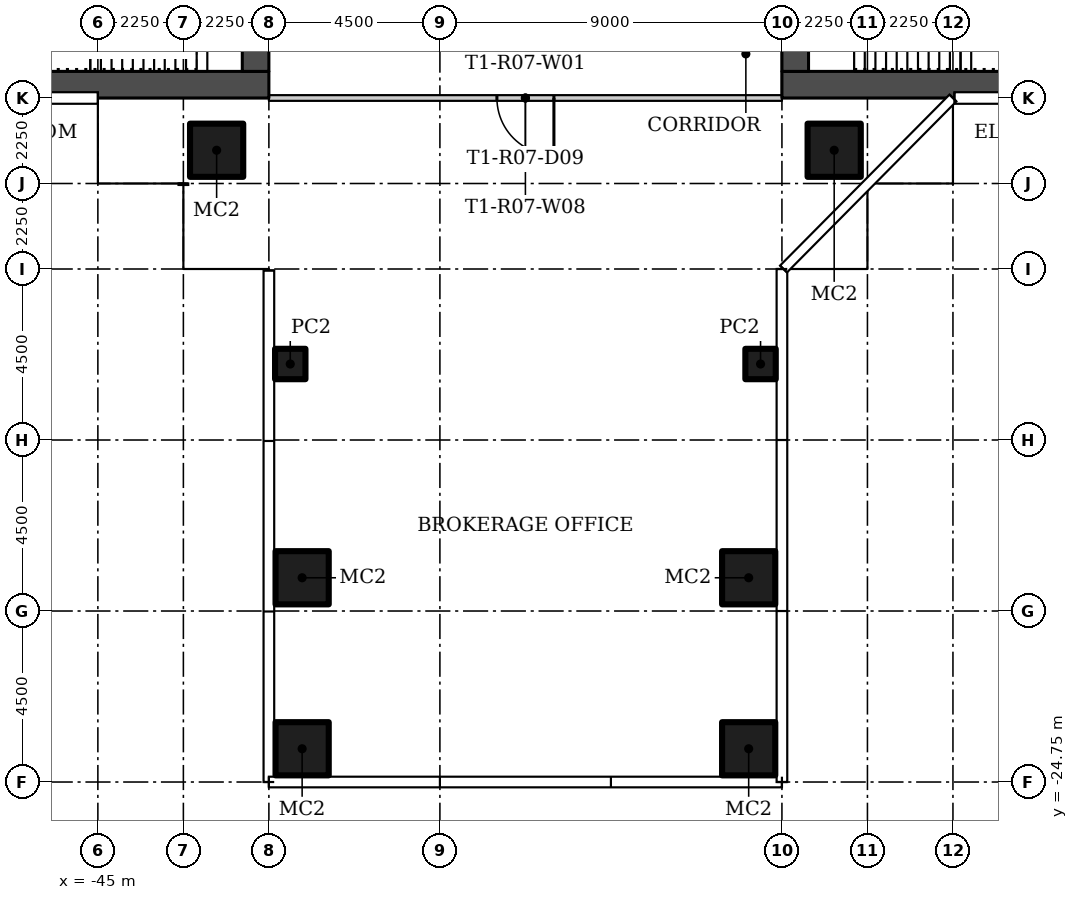
"""IFC4 building model, lengths in metres.
Left out: names, types, materials, properties, quantities, classifications, styles, units other than length and angle.
Written with IfcOpenShell. Run it as: python <this file> out.ifc"""

import sys

from ifc_helpers import new_model, si_unit, direction, frame, frame_2d, origin, origin_2d, place, context, subcontext, project, spatial, rectangle, hollow_rectangle, extrude, element, fill, save


model = new_model("IFC4")
c1 = context("Model", 3, precision=1e-05, world=origin(), true_north=direction((0.0, 1.0)))
c2 = subcontext(c1, "Body", "Model", "MODEL_VIEW")
j1 = project(units=[si_unit("LENGTHUNIT", "METRE"), si_unit("PLANEANGLEUNIT", "RADIAN")], contexts=[c1])
p1 = place(None, origin())
s1 = spatial("IfcSite", under=j1, at=p1, CompositionType="ELEMENT")
p2 = place(p1, origin())
s2 = spatial("IfcBuilding", under=s1, at=p2, CompositionType="ELEMENT")
p3 = place(p2, frame((0.0, 0.0, 69.3)))
s3 = spatial("IfcBuildingStorey", under=s2, at=p3, CompositionType="ELEMENT", Elevation=69.3)
for number, where in (
    (1, (-25.625, -8.125, 0.0)),
    (2, (-41.875, -8.125, 0.0)),
):
    element("IfcColumn", number, at=place(p3, frame(where)), inside=s3, PredefinedType="COLUMN", context=c2, shape_type="SweptSolid", body=[
        extrude(hollow_rectangle(XDim=1.4, YDim=1.4, WallThickness=0.05, at=origin_2d()), origin(), (0.0, 0.0, 1.0), 3.55),
    ])
p4 = place(p3, frame((-39.938, -13.75, 0.0)))
e3 = element("IfcColumn", 3, at=p4, inside=s3, PredefinedType="COLUMN", context=c2, shape_type="SweptSolid", body=[
    extrude(hollow_rectangle(XDim=0.8, YDim=0.8, WallThickness=0.025, at=origin_2d()), origin(), (0.0, 0.0, 1.0), 3.55),
])
for number, where in (
    (4, (-39.625, -19.375, 0.0)),
    (5, (-39.625, -23.875, 0.0)),
):
    element("IfcColumn", number, at=place(p3, frame(where)), inside=s3, PredefinedType="COLUMN", context=c2, shape_type="SweptSolid", body=[
        extrude(hollow_rectangle(XDim=1.4, YDim=1.4, WallThickness=0.05, at=origin_2d()), origin(), (0.0, 0.0, 1.0), 3.55),
    ])
p5 = place(p3, frame((-27.562, -13.75, 0.0)))
e6 = element("IfcColumn", 6, at=p5, inside=s3, PredefinedType="COLUMN", context=c2, shape_type="SweptSolid", body=[
    extrude(hollow_rectangle(XDim=0.8, YDim=0.8, WallThickness=0.025, at=origin_2d()), origin(), (0.0, 0.0, 1.0), 3.55),
])
for number, where in (
    (7, (-27.875, -19.375, 0.0)),
    (8, (-27.875, -23.875, 0.0)),
):
    element("IfcColumn", number, at=place(p3, frame(where)), inside=s3, PredefinedType="COLUMN", context=c2, shape_type="SweptSolid", body=[
        extrude(hollow_rectangle(XDim=1.4, YDim=1.4, WallThickness=0.05, at=origin_2d()), origin(), (0.0, 0.0, 1.0), 3.55),
    ])
p6 = place(p3, frame((-27.0, -6.75, 0.0), z_axis=(0.0, 0.0, 1.0), x_axis=(-1.0, 0.0, 0.0)))
e9 = element("IfcWall", 9, at=p6, inside=s3, PredefinedType="PARTITIONING", context=c2, shape_type="SweptSolid", body=[
    extrude(rectangle(XDim=13.5, YDim=0.15, at=frame_2d((6.75, 0.0))), origin(), (0.0, 0.0, 1.0), 3.55),
])
p7 = place(p6, frame((6.0, 0.0, 0.0)))
e10 = element("IfcOpeningElement", 10, at=p7, cuts=e9, PredefinedType="OPENING", context=c2, shape_type="SweptSolid", body=[
    extrude(rectangle(XDim=1.5, YDim=2.1, at=frame_2d((0.75, 1.05))), frame((0.0, 0.085, 0.0), z_axis=(0.0, -1.0, 0.0), x_axis=(1.0, 0.0, 0.0)), (0.0, 0.0, 1.0), 0.17),
])
p8 = place(p3, frame((-27.0, -6.4, 0.0)))
e11 = element("IfcWall", 11, at=p8, inside=s3, PredefinedType="SHEAR", context=c2, shape_type="SweptSolid", body=[
    extrude(rectangle(XDim=13.5, YDim=0.7, at=frame_2d((6.75, 0.0))), origin(), (0.0, 0.0, 1.0), 3.55),
])
p9 = place(p3, frame((-26.65, 6.05, 0.0), z_axis=(0.0, 0.0, 1.0), x_axis=(0.0, -1.0, 0.0)))
e12 = element("IfcWall", 12, at=p9, inside=s3, PredefinedType="SHEAR", context=c2, shape_type="SweptSolid", body=[
    extrude(rectangle(XDim=12.1, YDim=0.7, at=frame_2d((6.05, 0.0))), origin(), (0.0, 0.0, 1.0), 3.55),
])
p10 = place(p9, frame((3.9, 0.0, 0.0)))
e13 = element("IfcOpeningElement", 13, at=p10, cuts=e12, PredefinedType="OPENING", context=c2, shape_type="SweptSolid", body=[
    extrude(rectangle(XDim=1.8, YDim=2.4, at=frame_2d((0.9, 1.2))), frame((0.0, 0.36, 0.0), z_axis=(0.0, -1.0, 0.0), x_axis=(1.0, 0.0, 0.0)), (0.0, 0.0, 1.0), 0.72),
])
p11 = place(p3, frame((-40.5, -6.4, 0.0), z_axis=(0.0, 0.0, 1.0), x_axis=(-1.0, 0.0, 0.0)))
e14 = element("IfcWall", 14, at=p11, inside=s3, PredefinedType="SHEAR", context=c2, shape_type="SweptSolid", body=[
    extrude(rectangle(XDim=13.5, YDim=0.7, at=frame_2d((6.75, 0.0))), origin(), (0.0, 0.0, 1.0), 3.55),
])
p12 = place(p3, frame((-40.85, -6.05, 0.0), z_axis=(0.0, 0.0, 1.0), x_axis=(0.0, 1.0, 0.0)))
e15 = element("IfcWall", 15, at=p12, inside=s3, PredefinedType="SHEAR", context=c2, shape_type="SweptSolid", body=[
    extrude(rectangle(XDim=12.1, YDim=0.7, at=frame_2d((6.05, 0.0))), origin(), (0.0, 0.0, 1.0), 3.55),
])
p13 = place(p12, frame((6.4, 0.0, 0.0)))
e16 = element("IfcOpeningElement", 16, at=p13, cuts=e15, PredefinedType="OPENING", context=c2, shape_type="SweptSolid", body=[
    extrude(rectangle(XDim=1.8, YDim=2.4, at=frame_2d((0.9, 1.2))), frame((0.0, 0.36, 0.0), z_axis=(0.0, -1.0, 0.0), x_axis=(1.0, 0.0, 0.0)), (0.0, 0.0, 1.0), 0.72),
])
p14 = place(p7, origin())
e17 = element("IfcDoor", 17, at=p14, inside=s3, OperationType="DOUBLE_DOOR_SINGLE_SWING", PredefinedType="DOOR", context=c2, shape_type="SweptSolid", body=[
    extrude(rectangle(XDim=1.5, YDim=2.1, at=frame_2d((0.75, 1.05))), frame((0.0, 0.025, 0.0), z_axis=(0.0, -1.0, 0.0), x_axis=(1.0, 0.0, 0.0)), (0.0, 0.0, 1.0), 0.05),
])
fill(e10, e17)
save(model, sys.argv[1])
